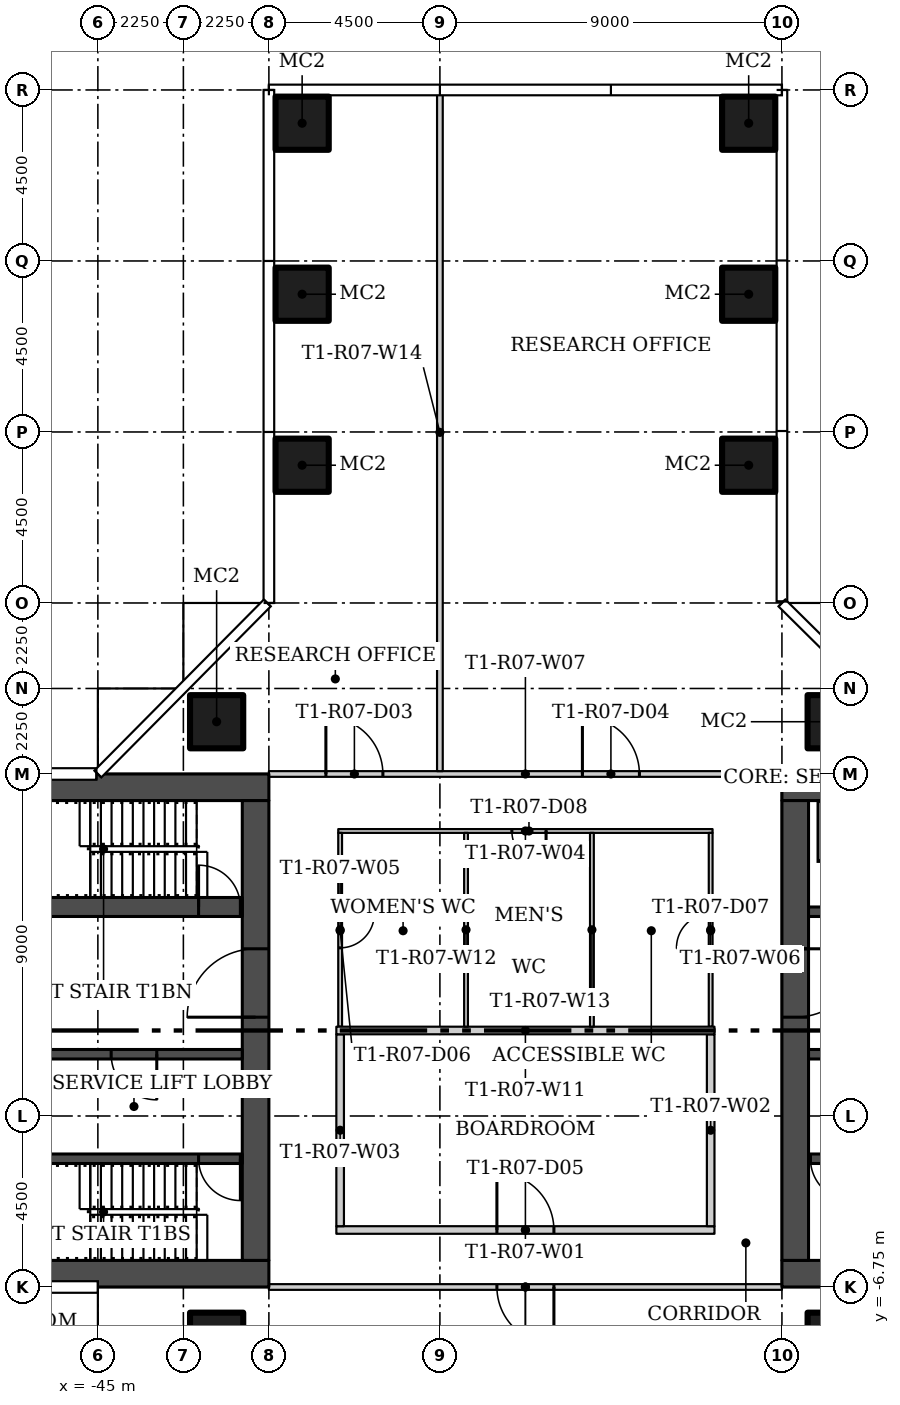
"""IFC4 building model, lengths in metres.
Left out: names, types, materials, properties, quantities, classifications, styles, units other than length and angle.
Written with IfcOpenShell. Run it as: python <this file> out.ifc"""

import sys

from ifc_helpers import new_model, si_unit, direction, frame, frame_2d, origin, origin_2d, place, context, subcontext, project, spatial, rectangle, hollow_rectangle, extrude, element, fill, save


model = new_model("IFC4")
c1 = context("Model", 3, precision=1e-05, world=origin(), true_north=direction((0.0, 1.0)))
c2 = subcontext(c1, "Body", "Model", "MODEL_VIEW")
j1 = project(units=[si_unit("LENGTHUNIT", "METRE"), si_unit("PLANEANGLEUNIT", "RADIAN")], contexts=[c1])
p1 = place(None, origin())
s1 = spatial("IfcSite", under=j1, at=p1, CompositionType="ELEMENT")
p2 = place(p1, origin())
s2 = spatial("IfcBuilding", under=s1, at=p2, CompositionType="ELEMENT")
p3 = place(p2, frame((0.0, 0.0, 69.3)))
s3 = spatial("IfcBuildingStorey", under=s2, at=p3, CompositionType="ELEMENT", Elevation=69.3)
for number, where in (
    (1, (-25.625, 8.125, 0.0)),
    (2, (-25.625, -8.125, 0.0)),
    (3, (-41.875, 8.125, 0.0)),
    (4, (-41.875, -8.125, 0.0)),
    (5, (-39.625, 14.875, 0.0)),
    (6, (-39.625, 19.375, 0.0)),
    (7, (-39.625, 23.875, 0.0)),
    (8, (-27.875, 14.875, 0.0)),
    (9, (-27.875, 19.375, 0.0)),
    (10, (-27.875, 23.875, 0.0)),
):
    element("IfcColumn", number, at=place(p3, frame(where)), inside=s3, PredefinedType="COLUMN", context=c2, shape_type="SweptSolid", body=[
        extrude(hollow_rectangle(XDim=1.4, YDim=1.4, WallThickness=0.05, at=origin_2d()), origin(), (0.0, 0.0, 1.0), 3.55),
    ])
p4 = place(p3, frame((-38.725, -5.25, 0.0)))
e11 = element("IfcWall", 11, at=p4, inside=s3, PredefinedType="PARTITIONING", context=c2, shape_type="SweptSolid", body=[
    extrude(rectangle(XDim=9.95, YDim=0.2, at=frame_2d((4.975, 0.0))), origin(), (0.0, 0.0, 1.0), 3.55),
])
p5 = place(p4, frame((4.225, 0.0, 0.0)))
e12 = element("IfcOpeningElement", 12, at=p5, cuts=e11, PredefinedType="OPENING", context=c2, shape_type="SweptSolid", body=[
    extrude(rectangle(XDim=1.5, YDim=2.4, at=frame_2d((0.75, 1.2))), frame((0.0, 0.11, 0.0), z_axis=(0.0, -1.0, 0.0), x_axis=(1.0, 0.0, 0.0)), (0.0, 0.0, 1.0), 0.22),
])
for number, where, z_axis, x_axis in (
    (13, (-28.875, -5.15, 0.0), (0.0, 0.0, 1.0), (0.0, 1.0, 0.0)),
    (14, (-38.625, -0.1, 0.0), (0.0, 0.0, 1.0), (0.0, -1.0, 0.0)),
):
    element("IfcWall", number, at=place(p3, frame(where, z_axis=z_axis, x_axis=x_axis)), inside=s3, PredefinedType="PARTITIONING", context=c2, shape_type="SweptSolid", body=[
        extrude(rectangle(XDim=5.05, YDim=0.2, at=frame_2d((2.525, 0.0))), origin(), (0.0, 0.0, 1.0), 3.55),
    ])
p6 = place(p3, frame((-28.825, 5.25, 0.0), z_axis=(0.0, 0.0, 1.0), x_axis=(-1.0, 0.0, 0.0)))
e15 = element("IfcWall", 15, at=p6, inside=s3, PredefinedType="PARTITIONING", context=c2, shape_type="SweptSolid", body=[
    extrude(rectangle(XDim=9.85, YDim=0.1, at=frame_2d((4.925, 0.0))), origin(), (0.0, 0.0, 1.0), 3.55),
])
p7 = place(p6, frame((4.381, 0.0, 0.0)))
e16 = element("IfcOpeningElement", 16, at=p7, cuts=e15, PredefinedType="OPENING", context=c2, shape_type="SweptSolid", body=[
    extrude(rectangle(XDim=0.9, YDim=2.1, at=frame_2d((0.45, 1.05))), frame((0.0, 0.06, 0.0), z_axis=(0.0, -1.0, 0.0), x_axis=(1.0, 0.0, 0.0)), (0.0, 0.0, 1.0), 0.12),
])
p8 = place(p3, frame((-38.625, 5.2, 0.0), z_axis=(0.0, 0.0, 1.0), x_axis=(0.0, -1.0, 0.0)))
e17 = element("IfcWall", 17, at=p8, inside=s3, PredefinedType="PARTITIONING", context=c2, shape_type="SweptSolid", body=[
    extrude(rectangle(XDim=5.1, YDim=0.1, at=frame_2d((2.55, 0.0))), origin(), (0.0, 0.0, 1.0), 3.55),
])
p9 = place(p8, frame((2.125, 0.0, 0.0)))
e18 = element("IfcOpeningElement", 18, at=p9, cuts=e17, PredefinedType="OPENING", context=c2, shape_type="SweptSolid", body=[
    extrude(rectangle(XDim=0.9, YDim=2.1, at=frame_2d((0.45, 1.05))), frame((0.0, 0.06, 0.0), z_axis=(0.0, -1.0, 0.0), x_axis=(1.0, 0.0, 0.0)), (0.0, 0.0, 1.0), 0.12),
])
p10 = place(p3, frame((-28.875, 0.1, 0.0), z_axis=(0.0, 0.0, 1.0), x_axis=(0.0, 1.0, 0.0)))
e19 = element("IfcWall", 19, at=p10, inside=s3, PredefinedType="PARTITIONING", context=c2, shape_type="SweptSolid", body=[
    extrude(rectangle(XDim=5.1, YDim=0.1, at=frame_2d((2.55, 0.0))), origin(), (0.0, 0.0, 1.0), 3.55),
])
p11 = place(p10, frame((2.075, 0.0, 0.0)))
e20 = element("IfcOpeningElement", 20, at=p11, cuts=e19, PredefinedType="OPENING", context=c2, shape_type="SweptSolid", body=[
    extrude(rectangle(XDim=0.9, YDim=2.1, at=frame_2d((0.45, 1.05))), frame((0.0, 0.06, 0.0), z_axis=(0.0, -1.0, 0.0), x_axis=(1.0, 0.0, 0.0)), (0.0, 0.0, 1.0), 0.12),
])
p12 = place(p3, frame((-40.5, 6.75, 0.0)))
e21 = element("IfcWall", 21, at=p12, inside=s3, PredefinedType="PARTITIONING", context=c2, shape_type="SweptSolid", body=[
    extrude(rectangle(XDim=13.5, YDim=0.15, at=frame_2d((6.75, 0.0))), origin(), (0.0, 0.0, 1.0), 3.55),
])
p13 = place(p12, frame((1.5, 0.0, 0.0)))
e22 = element("IfcOpeningElement", 22, at=p13, cuts=e21, PredefinedType="OPENING", context=c2, shape_type="SweptSolid", body=[
    extrude(rectangle(XDim=1.5, YDim=2.1, at=frame_2d((0.75, 1.05))), frame((0.0, 0.085, 0.0), z_axis=(0.0, -1.0, 0.0), x_axis=(1.0, 0.0, 0.0)), (0.0, 0.0, 1.0), 0.17),
])
p14 = place(p12, frame((8.25, 0.0, 0.0)))
e23 = element("IfcOpeningElement", 23, at=p14, cuts=e21, PredefinedType="OPENING", context=c2, shape_type="SweptSolid", body=[
    extrude(rectangle(XDim=1.5, YDim=2.1, at=frame_2d((0.75, 1.05))), frame((0.0, 0.085, 0.0), z_axis=(0.0, -1.0, 0.0), x_axis=(1.0, 0.0, 0.0)), (0.0, 0.0, 1.0), 0.17),
])
p15 = place(p3, frame((-27.0, -6.75, 0.0), z_axis=(0.0, 0.0, 1.0), x_axis=(-1.0, 0.0, 0.0)))
e24 = element("IfcWall", 24, at=p15, inside=s3, PredefinedType="PARTITIONING", context=c2, shape_type="SweptSolid", body=[
    extrude(rectangle(XDim=13.5, YDim=0.15, at=frame_2d((6.75, 0.0))), origin(), (0.0, 0.0, 1.0), 3.55),
])
p16 = place(p15, frame((6.0, 0.0, 0.0)))
e25 = element("IfcOpeningElement", 25, at=p16, cuts=e24, PredefinedType="OPENING", context=c2, shape_type="SweptSolid", body=[
    extrude(rectangle(XDim=1.5, YDim=2.1, at=frame_2d((0.75, 1.05))), frame((0.0, 0.085, 0.0), z_axis=(0.0, -1.0, 0.0), x_axis=(1.0, 0.0, 0.0)), (0.0, 0.0, 1.0), 0.17),
])
p17 = place(p3, frame((-28.775, 0.0, 0.0), z_axis=(0.0, 0.0, 1.0), x_axis=(-1.0, 0.0, 0.0)))
e26 = element("IfcWall", 26, at=p17, inside=s3, PredefinedType="PARTITIONING", context=c2, shape_type="SweptSolid", body=[
    extrude(rectangle(XDim=9.95, YDim=0.2, at=frame_2d((4.975, 0.0))), origin(), (0.0, 0.0, 1.0), 3.55),
])
for number, where, z_axis, x_axis in (
    (27, (-35.312, 0.1, 0.0), (0.0, 0.0, 1.0), (0.0, 1.0, 0.0)),
    (28, (-32.0, 0.1, 0.0), (0.0, 0.0, 1.0), (0.0, 1.0, 0.0)),
):
    element("IfcWall", number, at=place(p3, frame(where, z_axis=z_axis, x_axis=x_axis)), inside=s3, PredefinedType="PARTITIONING", context=c2, shape_type="SweptSolid", body=[
        extrude(rectangle(XDim=5.1, YDim=0.1, at=frame_2d((2.55, 0.0))), origin(), (0.0, 0.0, 1.0), 3.55),
    ])
p18 = place(p3, frame((-36.0, 6.825, 0.0), z_axis=(0.0, 0.0, 1.0), x_axis=(0.0, 1.0, 0.0)))
e29 = element("IfcWall", 29, at=p18, inside=s3, PredefinedType="PARTITIONING", context=c2, shape_type="SweptSolid", body=[
    extrude(rectangle(XDim=17.83, YDim=0.15, at=frame_2d((8.915, 0.0))), origin(), (0.0, 0.0, 1.0), 3.55),
])
for number, where in (
    (30, (-27.0, -6.4, 0.0)),
    (31, (-27.0, 6.4, 0.0)),
):
    element("IfcWall", number, at=place(p3, frame(where)), inside=s3, PredefinedType="SHEAR", context=c2, shape_type="SweptSolid", body=[
        extrude(rectangle(XDim=13.5, YDim=0.7, at=frame_2d((6.75, 0.0))), origin(), (0.0, 0.0, 1.0), 3.55),
    ])
p19 = place(p3, frame((-26.65, 6.05, 0.0), z_axis=(0.0, 0.0, 1.0), x_axis=(0.0, -1.0, 0.0)))
e32 = element("IfcWall", 32, at=p19, inside=s3, PredefinedType="SHEAR", context=c2, shape_type="SweptSolid", body=[
    extrude(rectangle(XDim=12.1, YDim=0.7, at=frame_2d((6.05, 0.0))), origin(), (0.0, 0.0, 1.0), 3.55),
])
p20 = place(p19, frame((3.9, 0.0, 0.0)))
e33 = element("IfcOpeningElement", 33, at=p20, cuts=e32, PredefinedType="OPENING", context=c2, shape_type="SweptSolid", body=[
    extrude(rectangle(XDim=1.8, YDim=2.4, at=frame_2d((0.9, 1.2))), frame((0.0, 0.36, 0.0), z_axis=(0.0, -1.0, 0.0), x_axis=(1.0, 0.0, 0.0)), (0.0, 0.0, 1.0), 0.72),
])
p21 = place(p3, frame((-14.2, -3.375, 0.0), z_axis=(0.0, 0.0, 1.0), x_axis=(-1.0, 0.0, 0.0)))
e34 = element("IfcWall", 34, at=p21, inside=s3, PredefinedType="SHEAR", context=c2, shape_type="SweptSolid", body=[
    extrude(rectangle(XDim=12.1, YDim=0.25, at=frame_2d((6.05, 0.0))), origin(), (0.0, 0.0, 1.0), 3.55),
])
p22 = place(p21, frame((10.95, 0.0, 0.0)))
e35 = element("IfcOpeningElement", 35, at=p22, cuts=e34, PredefinedType="OPENING", context=c2, shape_type="SweptSolid", body=[
    extrude(rectangle(XDim=1.1, YDim=2.1, at=frame_2d((0.55, 1.05))), frame((0.0, 0.135, 0.0), z_axis=(0.0, -1.0, 0.0), x_axis=(1.0, 0.0, 0.0)), (0.0, 0.0, 1.0), 0.27),
])
p23 = place(p3, frame((-14.2, -0.625, 0.0), z_axis=(0.0, 0.0, 1.0), x_axis=(-1.0, 0.0, 0.0)))
e36 = element("IfcWall", 36, at=p23, inside=s3, PredefinedType="SHEAR", context=c2, shape_type="SweptSolid", body=[
    extrude(rectangle(XDim=12.1, YDim=0.25, at=frame_2d((6.05, 0.0))), origin(), (0.0, 0.0, 1.0), 3.55),
])
p24 = place(p23, frame((8.65, 0.0, 0.0)))
e37 = element("IfcOpeningElement", 37, at=p24, cuts=e36, PredefinedType="OPENING", context=c2, shape_type="SweptSolid", body=[
    extrude(rectangle(XDim=1.2, YDim=2.1, at=frame_2d((0.6, 1.05))), frame((0.0, 0.135, 0.0), z_axis=(0.0, -1.0, 0.0), x_axis=(1.0, 0.0, 0.0)), (0.0, 0.0, 1.0), 0.27),
])
p25 = place(p23, frame((1.175, 0.0, 0.0)))
e38 = element("IfcOpeningElement", 38, at=p25, cuts=e36, PredefinedType="OPENING", context=c2, shape_type="SweptSolid", body=[
    extrude(rectangle(XDim=0.9, YDim=2.1, at=frame_2d((0.45, 1.05))), frame((0.0, 0.135, 0.0), z_axis=(0.0, -1.0, 0.0), x_axis=(1.0, 0.0, 0.0)), (0.0, 0.0, 1.0), 0.27),
])
p26 = place(p3, frame((-26.3, 3.125, 0.0)))
e39 = element("IfcWall", 39, at=p26, inside=s3, PredefinedType="SHEAR", context=c2, shape_type="SweptSolid", body=[
    extrude(rectangle(XDim=12.1, YDim=0.25, at=frame_2d((6.05, 0.0))), origin(), (0.0, 0.0, 1.0), 3.55),
])
p27 = place(p26, frame((0.85, 0.0, 0.0)))
e40 = element("IfcOpeningElement", 40, at=p27, cuts=e39, PredefinedType="OPENING", context=c2, shape_type="SweptSolid", body=[
    extrude(rectangle(XDim=1.1, YDim=2.1, at=frame_2d((0.55, 1.05))), frame((0.0, 0.135, 0.0), z_axis=(0.0, -1.0, 0.0), x_axis=(1.0, 0.0, 0.0)), (0.0, 0.0, 1.0), 0.27),
])
p28 = place(p26, frame((3.9, 0.0, 0.0)))
e41 = element("IfcOpeningElement", 41, at=p28, cuts=e39, PredefinedType="OPENING", context=c2, shape_type="SweptSolid", body=[
    extrude(rectangle(XDim=1.1, YDim=2.1, at=frame_2d((0.55, 1.05))), frame((0.0, 0.135, 0.0), z_axis=(0.0, -1.0, 0.0), x_axis=(1.0, 0.0, 0.0)), (0.0, 0.0, 1.0), 0.27),
])
for number, where, z_axis, x_axis in (
    (42, (-40.5, -6.4, 0.0), (0.0, 0.0, 1.0), (-1.0, 0.0, 0.0)),
    (43, (-40.5, 6.4, 0.0), (0.0, 0.0, 1.0), (-1.0, 0.0, 0.0)),
):
    element("IfcWall", number, at=place(p3, frame(where, z_axis=z_axis, x_axis=x_axis)), inside=s3, PredefinedType="SHEAR", context=c2, shape_type="SweptSolid", body=[
        extrude(rectangle(XDim=13.5, YDim=0.7, at=frame_2d((6.75, 0.0))), origin(), (0.0, 0.0, 1.0), 3.55),
    ])
p29 = place(p3, frame((-40.85, -6.05, 0.0), z_axis=(0.0, 0.0, 1.0), x_axis=(0.0, 1.0, 0.0)))
e44 = element("IfcWall", 44, at=p29, inside=s3, PredefinedType="SHEAR", context=c2, shape_type="SweptSolid", body=[
    extrude(rectangle(XDim=12.1, YDim=0.7, at=frame_2d((6.05, 0.0))), origin(), (0.0, 0.0, 1.0), 3.55),
])
p30 = place(p29, frame((6.4, 0.0, 0.0)))
e45 = element("IfcOpeningElement", 45, at=p30, cuts=e44, PredefinedType="OPENING", context=c2, shape_type="SweptSolid", body=[
    extrude(rectangle(XDim=1.8, YDim=2.4, at=frame_2d((0.9, 1.2))), frame((0.0, 0.36, 0.0), z_axis=(0.0, -1.0, 0.0), x_axis=(1.0, 0.0, 0.0)), (0.0, 0.0, 1.0), 0.72),
])
p31 = place(p3, frame((-41.2, -3.375, 0.0), z_axis=(0.0, 0.0, 1.0), x_axis=(-1.0, 0.0, 0.0)))
e46 = element("IfcWall", 46, at=p31, inside=s3, PredefinedType="SHEAR", context=c2, shape_type="SweptSolid", body=[
    extrude(rectangle(XDim=12.1, YDim=0.25, at=frame_2d((6.05, 0.0))), origin(), (0.0, 0.0, 1.0), 3.55),
])
p32 = place(p31, frame((0.05, 0.0, 0.0)))
e47 = element("IfcOpeningElement", 47, at=p32, cuts=e46, PredefinedType="OPENING", context=c2, shape_type="SweptSolid", body=[
    extrude(rectangle(XDim=1.1, YDim=2.1, at=frame_2d((0.55, 1.05))), frame((0.0, 0.135, 0.0), z_axis=(0.0, -1.0, 0.0), x_axis=(1.0, 0.0, 0.0)), (0.0, 0.0, 1.0), 0.27),
])
p33 = place(p3, frame((-41.2, -0.625, 0.0), z_axis=(0.0, 0.0, 1.0), x_axis=(-1.0, 0.0, 0.0)))
e48 = element("IfcWall", 48, at=p33, inside=s3, PredefinedType="SHEAR", context=c2, shape_type="SweptSolid", body=[
    extrude(rectangle(XDim=12.1, YDim=0.25, at=frame_2d((6.05, 0.0))), origin(), (0.0, 0.0, 1.0), 3.55),
])
p34 = place(p33, frame((2.25, 0.0, 0.0)))
e49 = element("IfcOpeningElement", 49, at=p34, cuts=e48, PredefinedType="OPENING", context=c2, shape_type="SweptSolid", body=[
    extrude(rectangle(XDim=1.2, YDim=2.1, at=frame_2d((0.6, 1.05))), frame((0.0, 0.135, 0.0), z_axis=(0.0, -1.0, 0.0), x_axis=(1.0, 0.0, 0.0)), (0.0, 0.0, 1.0), 0.27),
])
p35 = place(p33, frame((10.025, 0.0, 0.0)))
e50 = element("IfcOpeningElement", 50, at=p35, cuts=e48, PredefinedType="OPENING", context=c2, shape_type="SweptSolid", body=[
    extrude(rectangle(XDim=0.9, YDim=2.1, at=frame_2d((0.45, 1.05))), frame((0.0, 0.135, 0.0), z_axis=(0.0, -1.0, 0.0), x_axis=(1.0, 0.0, 0.0)), (0.0, 0.0, 1.0), 0.27),
])
p36 = place(p3, frame((-48.5, 3.25, 0.0)))
e51 = element("IfcWall", 51, at=p36, inside=s3, PredefinedType="SHEAR", context=c2, shape_type="SweptSolid", body=[
    extrude(rectangle(XDim=7.3, YDim=0.5, at=frame_2d((3.65, 0.0))), origin(), (0.0, 0.0, 1.0), 3.55),
])
p37 = place(p36, frame((6.15, 0.0, 0.0)))
e52 = element("IfcOpeningElement", 52, at=p37, cuts=e51, PredefinedType="OPENING", context=c2, shape_type="SweptSolid", body=[
    extrude(rectangle(XDim=1.1, YDim=2.1, at=frame_2d((0.55, 1.05))), frame((0.0, 0.26, 0.0), z_axis=(0.0, -1.0, 0.0), x_axis=(1.0, 0.0, 0.0)), (0.0, 0.0, 1.0), 0.52),
])
p38 = place(p13, origin())
e53 = element("IfcDoor", 53, at=p38, inside=s3, OperationType="DOUBLE_DOOR_SINGLE_SWING", PredefinedType="DOOR", context=c2, shape_type="SweptSolid", body=[
    extrude(rectangle(XDim=1.5, YDim=2.1, at=frame_2d((0.75, 1.05))), frame((0.0, 0.025, 0.0), z_axis=(0.0, -1.0, 0.0), x_axis=(1.0, 0.0, 0.0)), (0.0, 0.0, 1.0), 0.05),
])
fill(e22, e53)
p39 = place(p14, origin())
e54 = element("IfcDoor", 54, at=p39, inside=s3, OperationType="DOUBLE_DOOR_SINGLE_SWING", PredefinedType="DOOR", context=c2, shape_type="SweptSolid", body=[
    extrude(rectangle(XDim=1.5, YDim=2.1, at=frame_2d((0.75, 1.05))), frame((0.0, 0.025, 0.0), z_axis=(0.0, -1.0, 0.0), x_axis=(1.0, 0.0, 0.0)), (0.0, 0.0, 1.0), 0.05),
])
fill(e23, e54)
p40 = place(p5, origin())
e55 = element("IfcDoor", 55, at=p40, inside=s3, OperationType="DOUBLE_DOOR_SINGLE_SWING", PredefinedType="DOOR", context=c2, shape_type="SweptSolid", body=[
    extrude(rectangle(XDim=1.5, YDim=2.4, at=frame_2d((0.75, 1.2))), frame((0.0, 0.025, 0.0), z_axis=(0.0, -1.0, 0.0), x_axis=(1.0, 0.0, 0.0)), (0.0, 0.0, 1.0), 0.05),
])
fill(e12, e55)
p41 = place(p9, origin())
e56 = element("IfcDoor", 56, at=p41, inside=s3, OperationType="SINGLE_SWING_LEFT", PredefinedType="DOOR", context=c2, shape_type="SweptSolid", body=[
    extrude(rectangle(XDim=0.9, YDim=2.1, at=frame_2d((0.45, 1.05))), frame((0.0, 0.025, 0.0), z_axis=(0.0, -1.0, 0.0), x_axis=(1.0, 0.0, 0.0)), (0.0, 0.0, 1.0), 0.05),
])
fill(e18, e56)
p42 = place(p11, origin())
e57 = element("IfcDoor", 57, at=p42, inside=s3, OperationType="SINGLE_SWING_LEFT", PredefinedType="DOOR", context=c2, shape_type="SweptSolid", body=[
    extrude(rectangle(XDim=0.9, YDim=2.1, at=frame_2d((0.45, 1.05))), frame((0.0, 0.025, 0.0), z_axis=(0.0, -1.0, 0.0), x_axis=(1.0, 0.0, 0.0)), (0.0, 0.0, 1.0), 0.05),
])
fill(e20, e57)
p43 = place(p7, origin())
e58 = element("IfcDoor", 58, at=p43, inside=s3, OperationType="SINGLE_SWING_RIGHT", PredefinedType="DOOR", context=c2, shape_type="SweptSolid", body=[
    extrude(rectangle(XDim=0.9, YDim=2.1, at=frame_2d((0.45, 1.05))), frame((0.0, 0.025, 0.0), z_axis=(0.0, -1.0, 0.0), x_axis=(1.0, 0.0, 0.0)), (0.0, 0.0, 1.0), 0.05),
])
fill(e16, e58)
p44 = place(p16, origin())
e59 = element("IfcDoor", 59, at=p44, inside=s3, OperationType="DOUBLE_DOOR_SINGLE_SWING", PredefinedType="DOOR", context=c2, shape_type="SweptSolid", body=[
    extrude(rectangle(XDim=1.5, YDim=2.1, at=frame_2d((0.75, 1.05))), frame((0.0, 0.025, 0.0), z_axis=(0.0, -1.0, 0.0), x_axis=(1.0, 0.0, 0.0)), (0.0, 0.0, 1.0), 0.05),
])
fill(e25, e59)
p45 = place(p20, origin())
e60 = element("IfcDoor", 60, at=p45, inside=s3, OperationType="DOUBLE_DOOR_SINGLE_SWING", PredefinedType="DOOR", context=c2, shape_type="SweptSolid", body=[
    extrude(rectangle(XDim=1.8, YDim=2.4, at=frame_2d((0.9, 1.2))), frame((0.0, 0.025, 0.0), z_axis=(0.0, -1.0, 0.0), x_axis=(1.0, 0.0, 0.0)), (0.0, 0.0, 1.0), 0.05),
])
fill(e33, e60)
p46 = place(p22, origin())
e61 = element("IfcDoor", 61, at=p46, inside=s3, OperationType="SINGLE_SWING_RIGHT", PredefinedType="DOOR", context=c2, shape_type="SweptSolid", body=[
    extrude(rectangle(XDim=1.1, YDim=2.1, at=frame_2d((0.55, 1.05))), frame((0.0, 0.025, 0.0), z_axis=(0.0, -1.0, 0.0), x_axis=(1.0, 0.0, 0.0)), (0.0, 0.0, 1.0), 0.05),
])
fill(e35, e61)
p47 = place(p30, origin())
e62 = element("IfcDoor", 62, at=p47, inside=s3, OperationType="DOUBLE_DOOR_SINGLE_SWING", PredefinedType="DOOR", context=c2, shape_type="SweptSolid", body=[
    extrude(rectangle(XDim=1.8, YDim=2.4, at=frame_2d((0.9, 1.2))), frame((0.0, 0.025, 0.0), z_axis=(0.0, -1.0, 0.0), x_axis=(1.0, 0.0, 0.0)), (0.0, 0.0, 1.0), 0.05),
])
fill(e45, e62)
p48 = place(p32, origin())
e63 = element("IfcDoor", 63, at=p48, inside=s3, OperationType="SINGLE_SWING_LEFT", PredefinedType="DOOR", context=c2, shape_type="SweptSolid", body=[
    extrude(rectangle(XDim=1.1, YDim=2.1, at=frame_2d((0.55, 1.05))), frame((0.0, 0.025, 0.0), z_axis=(0.0, -1.0, 0.0), x_axis=(1.0, 0.0, 0.0)), (0.0, 0.0, 1.0), 0.05),
])
fill(e47, e63)
p49 = place(p34, origin())
e64 = element("IfcDoor", 64, at=p49, inside=s3, OperationType="SINGLE_SWING_LEFT", PredefinedType="DOOR", context=c2, shape_type="SweptSolid", body=[
    extrude(rectangle(XDim=1.2, YDim=2.1, at=frame_2d((0.6, 1.05))), frame((0.0, 0.025, 0.0), z_axis=(0.0, -1.0, 0.0), x_axis=(1.0, 0.0, 0.0)), (0.0, 0.0, 1.0), 0.05),
])
fill(e49, e64)
p50 = place(p37, origin())
e65 = element("IfcDoor", 65, at=p50, inside=s3, OperationType="SINGLE_SWING_RIGHT", PredefinedType="DOOR", context=c2, shape_type="SweptSolid", body=[
    extrude(rectangle(XDim=1.1, YDim=2.1, at=frame_2d((0.55, 1.05))), frame((0.0, 0.025, 0.0), z_axis=(0.0, -1.0, 0.0), x_axis=(1.0, 0.0, 0.0)), (0.0, 0.0, 1.0), 0.05),
])
fill(e52, e65)
save(model, sys.argv[1])
